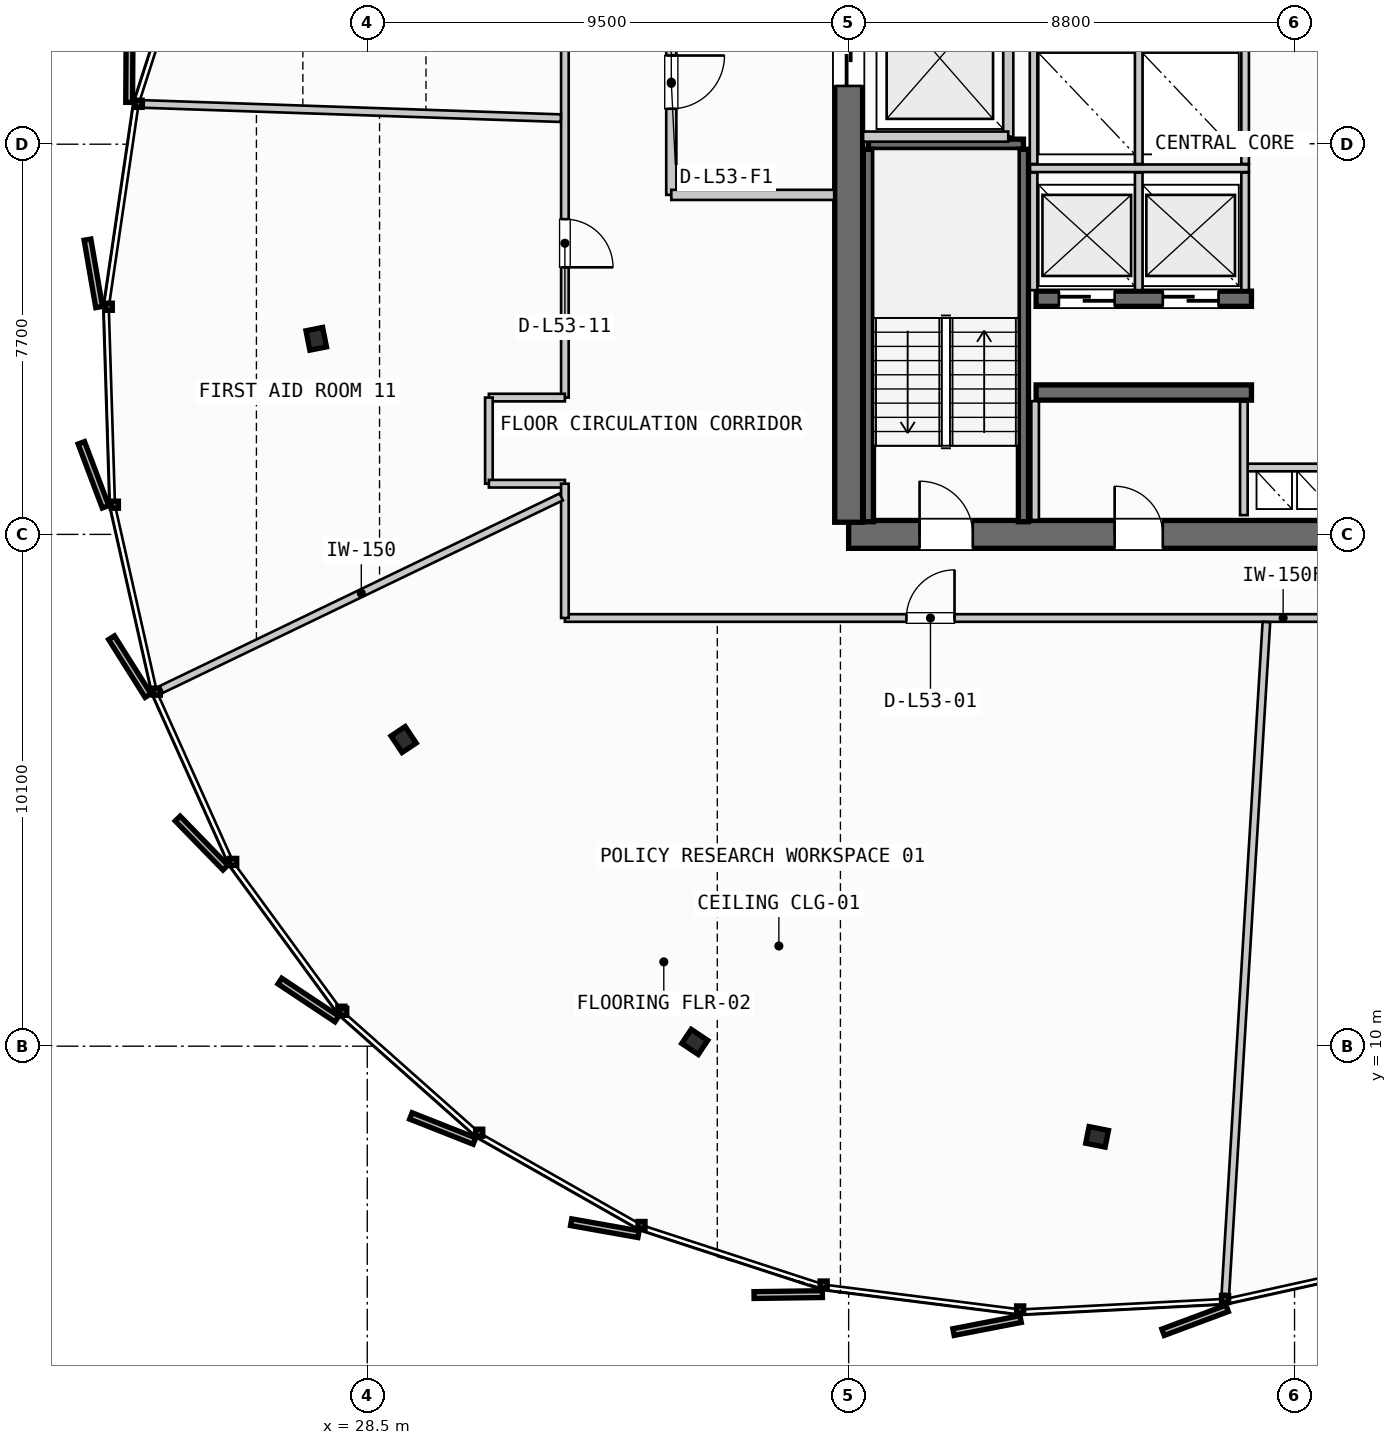
"""IFC4 building model, lengths in metres.
Left out: names, types, materials, properties, quantities, classifications, styles, units other than length and angle.
Written with IfcOpenShell. Run it as: python <this file> out.ifc"""

import sys

from ifc_helpers import new_model, si_unit, direction, frame, frame_2d, origin, origin_2d, place, context, subcontext, project, spatial, rectangle, i_section, extrude, source, transform, mapped, element, fill, save


model = new_model("IFC4")
c1 = context("Model", 3, precision=1e-05, world=origin(), true_north=direction((0.0, 1.0)))
c2 = subcontext(c1, "Body", "Model", "MODEL_VIEW")
j1 = project(units=[si_unit("LENGTHUNIT", "METRE"), si_unit("PLANEANGLEUNIT", "RADIAN")], contexts=[c1])
p1 = place(None, origin())
s1 = spatial("IfcSite", under=j1, at=p1, CompositionType="ELEMENT")
p2 = place(p1, origin())
s2 = spatial("IfcBuilding", under=s1, at=p2, CompositionType="ELEMENT")
p3 = place(p2, frame((0.0, 0.0, 204.4)))
s3 = spatial("IfcBuildingStorey", under=s2, at=p3, CompositionType="ELEMENT", Elevation=204.4)
p4 = place(p3, frame((38.0, 20.1, 0.0), z_axis=(0.0, 0.0, 1.0), x_axis=(1.0, 0.0, 0.0)))
e1 = element("IfcWall", 1, at=p4, inside=s3, PredefinedType="SHEAR", context=c2, shape_type="SweptSolid", body=[
    extrude(rectangle(XDim=17.6, YDim=0.55, at=frame_2d((8.8, 0.0))), origin(), (0.0, 0.0, 1.0), 3.26),
])
p5 = place(p4, frame((1.4, 0.0, 0.0)))
e2 = element("IfcOpeningElement", 2, at=p5, cuts=e1, PredefinedType="OPENING", context=c2, shape_type="SweptSolid", body=[
    extrude(rectangle(XDim=1.05, YDim=2.15, at=frame_2d((0.525, 1.075))), frame((0.0, 0.285, 0.0), z_axis=(0.0, -1.0, 0.0), x_axis=(1.0, 0.0, 0.0)), (0.0, 0.0, 1.0), 0.57),
])
p6 = place(p4, frame((15.15, 0.0, 0.0)))
e3 = element("IfcOpeningElement", 3, at=p6, cuts=e1, PredefinedType="OPENING", context=c2, shape_type="SweptSolid", body=[
    extrude(rectangle(XDim=1.05, YDim=2.15, at=frame_2d((0.525, 1.075))), frame((0.0, 0.285, 0.0), z_axis=(0.0, -1.0, 0.0), x_axis=(1.0, 0.0, 0.0)), (0.0, 0.0, 1.0), 0.57),
])
p7 = place(p4, frame((5.25, 0.0, 0.0)))
e4 = element("IfcOpeningElement", 4, at=p7, cuts=e1, PredefinedType="OPENING", context=c2, shape_type="SweptSolid", body=[
    extrude(rectangle(XDim=0.95, YDim=2.15, at=frame_2d((0.475, 1.075))), frame((0.0, 0.285, 0.0), z_axis=(0.0, -1.0, 0.0), x_axis=(1.0, 0.0, 0.0)), (0.0, 0.0, 1.0), 0.57),
])
p8 = place(p4, frame((11.4, 0.0, 0.0)))
e5 = element("IfcOpeningElement", 5, at=p8, cuts=e1, PredefinedType="OPENING", context=c2, shape_type="SweptSolid", body=[
    extrude(rectangle(XDim=0.95, YDim=2.15, at=frame_2d((0.475, 1.075))), frame((0.0, 0.285, 0.0), z_axis=(0.0, -1.0, 0.0), x_axis=(1.0, 0.0, 0.0)), (0.0, 0.0, 1.0), 0.57),
])
p9 = place(p3, frame((38.0, 35.26, 0.0), z_axis=(0.0, 0.0, 1.0), x_axis=(0.0, -1.0, 0.0)))
e6 = element("IfcWall", 6, at=p9, inside=s3, PredefinedType="SHEAR", context=c2, shape_type="SweptSolid", body=[
    extrude(rectangle(XDim=14.92, YDim=0.55, at=frame_2d((7.46, 0.0))), origin(), (0.0, 0.0, 1.0), 3.26),
])
p10 = place(p9, frame((5.21, 0.0, 0.0)))
e7 = element("IfcOpeningElement", 7, at=p10, cuts=e6, PredefinedType="OPENING", context=c2, shape_type="SweptSolid", body=[
    extrude(rectangle(XDim=1.1, YDim=2.2, at=frame_2d((0.55, 1.1))), frame((0.0, 0.285, 0.0), z_axis=(0.0, -1.0, 0.0), x_axis=(1.0, 0.0, 0.0)), (0.0, 0.0, 1.0), 0.57),
])
p11 = place(p3, frame((41.7, 22.9, 0.0), z_axis=(0.0, 0.0, 1.0), x_axis=(1.0, 0.0, 0.0)))
e8 = element("IfcWall", 8, at=p11, inside=s3, PredefinedType="SHEAR", context=c2, shape_type="SweptSolid", body=[
    extrude(rectangle(XDim=4.25, YDim=0.3, at=frame_2d((2.125, 0.0))), origin(), (0.0, 0.0, 1.0), 3.26),
])
p12 = place(p3, frame((41.7, 24.75, 0.0), z_axis=(0.0, 0.0, 1.0), x_axis=(1.0, 0.0, 0.0)))
e9 = element("IfcWall", 9, at=p12, inside=s3, PredefinedType="SHEAR", context=c2, shape_type="SweptSolid", body=[
    extrude(rectangle(XDim=4.25, YDim=0.3, at=frame_2d((2.125, 0.0))), origin(), (0.0, 0.0, 1.0), 3.26),
])
p13 = place(p12, frame((0.45, 0.0, 0.0)))
e10 = element("IfcOpeningElement", 10, at=p13, cuts=e9, PredefinedType="OPENING", context=c2, shape_type="SweptSolid", body=[
    extrude(rectangle(XDim=1.1, YDim=2.2, at=frame_2d((0.55, 1.1))), frame((0.0, 0.16, 0.0), z_axis=(0.0, -1.0, 0.0), x_axis=(1.0, 0.0, 0.0)), (0.0, 0.0, 1.0), 0.32),
])
p14 = place(p12, frame((2.5, 0.0, 0.0)))
e11 = element("IfcOpeningElement", 11, at=p14, cuts=e9, PredefinedType="OPENING", context=c2, shape_type="SweptSolid", body=[
    extrude(rectangle(XDim=1.1, YDim=2.2, at=frame_2d((0.55, 1.1))), frame((0.0, 0.16, 0.0), z_axis=(0.0, -1.0, 0.0), x_axis=(1.0, 0.0, 0.0)), (0.0, 0.0, 1.0), 0.32),
])
m1 = source(origin(), c2, "Body", "SweptSolid", [
    extrude(i_section(OverallWidth=0.391, OverallDepth=0.335, WebThickness=0.023, FlangeThickness=0.034, FilletRadius=0.015, at=origin_2d()), origin(), (0.0, 0.0, 1.0), 3.26),
])
for number, where, z_axis, x_axis in (
    (12, (27.493, 23.96, 0.0), (0.0, 0.0, 1.0), (-0.981, -0.195, 0.0)),
    (13, (29.218, 16.052, 0.0), (0.0, 0.0, 1.0), (-0.831, -0.556, 0.0)),
    (14, (34.963, 10.084, 0.0), (0.0, 0.0, 1.0), (-0.556, -0.831, 0.0)),
    (15, (42.904, 8.211, 0.0), (0.0, 0.0, 1.0), (-0.195, -0.981, 0.0)),
):
    element("IfcColumn", number, at=place(p3, frame(where, z_axis=z_axis, x_axis=x_axis)), inside=s3, PredefinedType="COLUMN", context=c2, shape_type="MappedRepresentation", body=[
        mapped(m1, transform((0.0, 0.0, 0.0), scale=1.0)),
    ])
p15 = place(p3, frame((38.39, 27.8, 0.0), z_axis=(0.0, 0.0, 1.0), x_axis=(1.0, 0.0, 0.0)))
e16 = element("IfcWall", 16, at=p15, inside=s3, PredefinedType="SHEAR", context=c2, shape_type="SweptSolid", body=[
    extrude(rectangle(XDim=3.06, YDim=0.2, at=frame_2d((1.53, 0.0))), origin(), (0.0, 0.0, 1.0), 3.26),
])
for number, where, z_axis, x_axis in (
    (17, (41.45, 27.7, 0.0), (0.0, 0.0, 1.0), (0.0, -1.0, 0.0)),
    (18, (38.39, 20.35, 0.0), (0.0, 0.0, 1.0), (0.0, 1.0, 0.0)),
):
    element("IfcWall", number, at=place(p3, frame(where, z_axis=z_axis, x_axis=x_axis)), inside=s3, PredefinedType="SHEAR", context=c2, shape_type="SweptSolid", body=[
        extrude(rectangle(XDim=7.35, YDim=0.2, at=frame_2d((3.675, 0.0))), origin(), (0.0, 0.0, 1.0), 3.26),
    ])
p16 = place(p3, frame((45.8, 21.42, 0.0), z_axis=(0.0, 0.0, 1.0), x_axis=(1.0, 0.0, 0.0)))
e19 = element("IfcWall", 19, at=p16, inside=s3, PredefinedType="PARTITIONING", context=c2, shape_type="SweptSolid", body=[
    extrude(rectangle(XDim=2.0, YDim=0.15, at=frame_2d((1.0, 0.0))), origin(), (0.0, 0.0, 1.0), 2.595),
])
p17 = place(p3, frame((45.8, 20.48, 0.0), z_axis=(0.0, 0.0, 1.0), x_axis=(0.0, 1.0, 0.0)))
e20 = element("IfcWall", 20, at=p17, inside=s3, PredefinedType="PARTITIONING", context=c2, shape_type="SweptSolid", body=[
    extrude(rectangle(XDim=2.24, YDim=0.15, at=frame_2d((1.12, 0.0))), origin(), (0.0, 0.0, 1.0), 2.595),
])
p18 = place(p3, frame((41.15, 27.95, 0.0), z_axis=(0.0, 0.0, 1.0), x_axis=(0.0, 1.0, 0.0)))
e21 = element("IfcWall", 21, at=p18, inside=s3, PredefinedType="PARTITIONING", context=c2, shape_type="SweptSolid", body=[
    extrude(rectangle(XDim=3.1, YDim=0.2, at=frame_2d((1.55, 0.0))), origin(), (0.0, 0.0, 1.0), 2.595),
])
p19 = place(p3, frame((38.285, 27.95, 0.0), z_axis=(0.0, 0.0, 1.0), x_axis=(1.0, 0.0, 0.0)))
e22 = element("IfcWall", 22, at=p19, inside=s3, PredefinedType="PARTITIONING", context=c2, shape_type="SweptSolid", body=[
    extrude(rectangle(XDim=2.865, YDim=0.2, at=frame_2d((1.433, 0.0))), origin(), (0.0, 0.0, 1.0), 2.595),
])
p20 = place(p3, frame((34.5, 31.2, 0.0), z_axis=(0.0, 0.0, 1.0), x_axis=(0.0, -1.0, 0.0)))
e23 = element("IfcWall", 23, at=p20, inside=s3, PredefinedType="PARTITIONING", context=c2, shape_type="SweptSolid", body=[
    extrude(rectangle(XDim=4.4, YDim=0.2, at=frame_2d((2.2, 0.0))), origin(), (0.0, 0.0, 1.0), 2.595),
])
p21 = place(p20, frame((1.65, 0.0, 0.0)))
e24 = element("IfcOpeningElement", 24, at=p21, cuts=e23, PredefinedType="OPENING", context=c2, shape_type="SweptSolid", body=[
    extrude(rectangle(XDim=1.05, YDim=2.15, at=frame_2d((0.525, 1.075))), frame((0.0, 0.11, 0.0), z_axis=(0.0, -1.0, 0.0), x_axis=(1.0, 0.0, 0.0)), (0.0, 0.0, 1.0), 0.22),
])
p22 = place(p3, frame((34.5, 26.8, 0.0), z_axis=(0.0, 0.0, 1.0), x_axis=(1.0, 0.0, 0.0)))
e25 = element("IfcWall", 25, at=p22, inside=s3, PredefinedType="PARTITIONING", context=c2, shape_type="SweptSolid", body=[
    extrude(rectangle(XDim=3.215, YDim=0.2, at=frame_2d((1.607, 0.0))), origin(), (0.0, 0.0, 1.0), 2.595),
])
p23 = place(p3, frame((41.68, 20.385, 0.0), z_axis=(0.0, 0.0, 1.0), x_axis=(0.0, 1.0, 0.0)))
e26 = element("IfcWall", 26, at=p23, inside=s3, PredefinedType="PARTITIONING", context=c2, shape_type="SweptSolid", body=[
    extrude(rectangle(XDim=2.345, YDim=0.15, at=frame_2d((1.172, 0.0))), origin(), (0.0, 0.0, 1.0), 2.595),
])
p24 = place(p3, frame((41.58, 27.325, 0.0), z_axis=(0.0, 0.0, 1.0), x_axis=(1.0, 0.0, 0.0)))
e27 = element("IfcWall", 27, at=p24, inside=s3, PredefinedType="PARTITIONING", context=c2, shape_type="SweptSolid", body=[
    extrude(rectangle(XDim=4.32, YDim=0.15, at=frame_2d((2.16, 0.0))), origin(), (0.0, 0.0, 1.0), 2.595),
])
for number, where, z_axis, x_axis in (
    (28, (41.65, 24.92, 0.0), (0.0, 0.0, 1.0), (0.0, 1.0, 0.0)),
    (29, (43.725, 24.92, 0.0), (0.0, 0.0, 1.0), (0.0, 1.0, 0.0)),
    (30, (45.825, 24.92, 0.0), (0.0, 0.0, 1.0), (0.0, 1.0, 0.0)),
):
    element("IfcWall", number, at=place(p3, frame(where, z_axis=z_axis, x_axis=x_axis)), inside=s3, PredefinedType="PARTITIONING", context=c2, shape_type="SweptSolid", body=[
        extrude(rectangle(XDim=2.32, YDim=0.15, at=frame_2d((1.16, 0.0))), origin(), (0.0, 0.0, 1.0), 2.595),
    ])
for number, where, z_axis, x_axis in (
    (31, (41.65, 27.41, 0.0), (0.0, 0.0, 1.0), (0.0, 1.0, 0.0)),
    (32, (43.725, 27.41, 0.0), (0.0, 0.0, 1.0), (0.0, 1.0, 0.0)),
    (33, (45.825, 27.41, 0.0), (0.0, 0.0, 1.0), (0.0, 1.0, 0.0)),
):
    element("IfcWall", number, at=place(p3, frame(where, z_axis=z_axis, x_axis=x_axis)), inside=s3, PredefinedType="PARTITIONING", context=c2, shape_type="SweptSolid", body=[
        extrude(rectangle(XDim=2.27, YDim=0.15, at=frame_2d((1.135, 0.0))), origin(), (0.0, 0.0, 1.0), 2.595),
    ])
p25 = place(p3, frame((32.4, 18.45, 0.0), z_axis=(0.0, 0.0, 1.0), x_axis=(1.0, 0.0, 0.0)))
e34 = element("IfcWall", 34, at=p25, inside=s3, PredefinedType="PARTITIONING", context=c2, shape_type="SweptSolid", body=[
    extrude(rectangle(XDim=28.35, YDim=0.15, at=frame_2d((14.175, 0.0))), origin(), (0.0, 0.0, 1.0), 2.595),
])
p26 = place(p25, frame((6.74, 0.0, 0.0)))
e35 = element("IfcOpeningElement", 35, at=p26, cuts=e34, PredefinedType="OPENING", context=c2, shape_type="SweptSolid", body=[
    extrude(rectangle(XDim=0.95, YDim=2.15, at=frame_2d((0.475, 1.075))), frame((0.0, 0.085, 0.0), z_axis=(0.0, -1.0, 0.0), x_axis=(1.0, 0.0, 0.0)), (0.0, 0.0, 1.0), 0.17),
])
p27 = place(p25, frame((20.335, 0.0, 0.0)))
e36 = element("IfcOpeningElement", 36, at=p27, cuts=e34, PredefinedType="OPENING", context=c2, shape_type="SweptSolid", body=[
    extrude(rectangle(XDim=0.95, YDim=2.15, at=frame_2d((0.475, 1.075))), frame((0.0, 0.085, 0.0), z_axis=(0.0, -1.0, 0.0), x_axis=(1.0, 0.0, 0.0)), (0.0, 0.0, 1.0), 0.17),
])
p28 = place(p3, frame((32.4, 32.8, 0.0), z_axis=(0.0, 0.0, 1.0), x_axis=(0.0, -1.0, 0.0)))
e37 = element("IfcWall", 37, at=p28, inside=s3, PredefinedType="PARTITIONING", context=c2, shape_type="SweptSolid", body=[
    extrude(rectangle(XDim=10.0, YDim=0.15, at=frame_2d((5.0, 0.0))), origin(), (0.0, 0.0, 1.0), 2.595),
])
p29 = place(p28, frame((2.059, 0.0, 0.0)))
e38 = element("IfcOpeningElement", 38, at=p29, cuts=e37, PredefinedType="OPENING", context=c2, shape_type="SweptSolid", body=[
    extrude(rectangle(XDim=0.95, YDim=2.15, at=frame_2d((0.475, 1.075))), frame((0.0, 0.085, 0.0), z_axis=(0.0, -1.0, 0.0), x_axis=(1.0, 0.0, 0.0)), (0.0, 0.0, 1.0), 0.17),
])
p30 = place(p28, frame((6.479, 0.0, 0.0)))
e39 = element("IfcOpeningElement", 39, at=p30, cuts=e37, PredefinedType="OPENING", context=c2, shape_type="SweptSolid", body=[
    extrude(rectangle(XDim=0.95, YDim=2.15, at=frame_2d((0.475, 1.075))), frame((0.0, 0.085, 0.0), z_axis=(0.0, -1.0, 0.0), x_axis=(1.0, 0.0, 0.0)), (0.0, 0.0, 1.0), 0.17),
])
p31 = place(p3, frame((32.4, 22.8, 0.0), z_axis=(0.0, 0.0, 1.0), x_axis=(-1.0, 0.0, 0.0)))
e40 = element("IfcWall", 40, at=p31, inside=s3, PredefinedType="PARTITIONING", context=c2, shape_type="SweptSolid", body=[
    extrude(rectangle(XDim=1.5, YDim=0.15, at=frame_2d((0.75, 0.0))), origin(), (0.0, 0.0, 1.0), 2.595),
])
p32 = place(p3, frame((30.9, 22.8, 0.0), z_axis=(0.0, 0.0, 1.0), x_axis=(0.0, -1.0, 0.0)))
e41 = element("IfcWall", 41, at=p32, inside=s3, PredefinedType="PARTITIONING", context=c2, shape_type="SweptSolid", body=[
    extrude(rectangle(XDim=1.7, YDim=0.15, at=frame_2d((0.85, 0.0))), origin(), (0.0, 0.0, 1.0), 2.595),
])
p33 = place(p3, frame((30.9, 21.1, 0.0), z_axis=(0.0, 0.0, 1.0), x_axis=(1.0, 0.0, 0.0)))
e42 = element("IfcWall", 42, at=p33, inside=s3, PredefinedType="PARTITIONING", context=c2, shape_type="SweptSolid", body=[
    extrude(rectangle(XDim=1.5, YDim=0.15, at=frame_2d((0.75, 0.0))), origin(), (0.0, 0.0, 1.0), 2.595),
])
p34 = place(p3, frame((32.4, 21.1, 0.0), z_axis=(0.0, 0.0, 1.0), x_axis=(0.0, -1.0, 0.0)))
e43 = element("IfcWall", 43, at=p34, inside=s3, PredefinedType="PARTITIONING", context=c2, shape_type="SweptSolid", body=[
    extrude(rectangle(XDim=2.65, YDim=0.15, at=frame_2d((1.325, 0.0))), origin(), (0.0, 0.0, 1.0), 2.595),
])
p35 = place(p3, frame((32.328, 20.839, 0.0), z_axis=(0.0, 0.0, 1.0), x_axis=(-0.901038386283, -0.43373935312, 0.0)))
e44 = element("IfcWall", 44, at=p35, inside=s3, PredefinedType="PARTITIONING", context=c2, shape_type="SweptSolid", body=[
    extrude(rectangle(XDim=8.759, YDim=0.15, at=frame_2d((4.379, 0.0))), origin(), (0.0, 0.0, 1.0), 2.595),
])
p36 = place(p3, frame((46.245, 18.37, 0.0), z_axis=(0.0, 0.0, 1.0), x_axis=(-0.060966188307, -0.998139831829, 0.0)))
e45 = element("IfcWall", 45, at=p36, inside=s3, PredefinedType="PARTITIONING", context=c2, shape_type="SweptSolid", body=[
    extrude(rectangle(XDim=13.283, YDim=0.15, at=frame_2d((6.642, 0.0))), origin(), (0.0, 0.0, 1.0), 2.595),
])
p37 = place(p3, frame((32.32, 28.314, 0.0), z_axis=(0.0, 0.0, 1.0), x_axis=(-0.999420901032, 0.034027379868, 0.0)))
e46 = element("IfcWall", 46, at=p37, inside=s3, PredefinedType="PARTITIONING", context=c2, shape_type="SweptSolid", body=[
    extrude(rectangle(XDim=8.237, YDim=0.15, at=frame_2d((4.118, 0.0))), origin(), (0.0, 0.0, 1.0), 2.595),
])
m2 = source(origin(), c2, "Body", "SweptSolid", [
    extrude(rectangle(XDim=1.05, YDim=2.15, at=frame_2d((0.525, 1.075))), frame((0.0, 0.025, 0.0), z_axis=(0.0, -1.0, 0.0), x_axis=(1.0, 0.0, 0.0)), (0.0, 0.0, 1.0), 0.05),
])
p38 = place(p5, origin())
e47 = element("IfcDoor", 47, at=p38, inside=s3, OperationType="SINGLE_SWING_LEFT", PredefinedType="DOOR", context=c2, shape_type="MappedRepresentation", body=[
    mapped(m2, transform((0.0, 0.0, 0.0), scale=1.0)),
])
fill(e2, e47)
m3 = source(origin(), c2, "Body", "SweptSolid", [
    extrude(rectangle(XDim=1.1, YDim=2.2, at=frame_2d((0.55, 1.1))), frame((0.0, 0.025, 0.0), z_axis=(0.0, -1.0, 0.0), x_axis=(1.0, 0.0, 0.0)), (0.0, 0.0, 1.0), 0.05),
])
p39 = place(p10, origin())
e48 = element("IfcDoor", 48, at=p39, inside=s3, OperationType="SLIDING_TO_LEFT", PredefinedType="DOOR", context=c2, shape_type="MappedRepresentation", body=[
    mapped(m3, transform((0.0, 0.0, 0.0), scale=1.0)),
])
fill(e7, e48)
m4 = source(origin(), c2, "Body", "SweptSolid", [
    extrude(rectangle(XDim=0.95, YDim=2.15, at=frame_2d((0.475, 1.075))), frame((0.0, 0.025, 0.0), z_axis=(0.0, -1.0, 0.0), x_axis=(1.0, 0.0, 0.0)), (0.0, 0.0, 1.0), 0.05),
])
p40 = place(p7, origin())
e49 = element("IfcDoor", 49, at=p40, inside=s3, OperationType="SINGLE_SWING_LEFT", PredefinedType="DOOR", context=c2, shape_type="MappedRepresentation", body=[
    mapped(m4, transform((0.0, 0.0, 0.0), scale=1.0)),
])
fill(e4, e49)
p41 = place(p13, origin())
e50 = element("IfcDoor", 50, at=p41, inside=s3, OperationType="SLIDING_TO_RIGHT", PredefinedType="DOOR", context=c2, shape_type="MappedRepresentation", body=[
    mapped(m3, transform((0.0, 0.0, 0.0), scale=1.0)),
])
fill(e10, e50)
p42 = place(p14, origin())
e51 = element("IfcDoor", 51, at=p42, inside=s3, OperationType="SLIDING_TO_RIGHT", PredefinedType="DOOR", context=c2, shape_type="MappedRepresentation", body=[
    mapped(m3, transform((0.0, 0.0, 0.0), scale=1.0)),
])
fill(e11, e51)
p43 = place(p21, origin())
e52 = element("IfcDoor", 52, at=p43, inside=s3, OperationType="SINGLE_SWING_LEFT", PredefinedType="DOOR", context=c2, shape_type="MappedRepresentation", body=[
    mapped(m2, transform((0.0, 0.0, 0.0), scale=1.0)),
])
fill(e24, e52)
p44 = place(p26, origin())
e53 = element("IfcDoor", 53, at=p44, inside=s3, OperationType="SINGLE_SWING_RIGHT", PredefinedType="DOOR", context=c2, shape_type="MappedRepresentation", body=[
    mapped(m4, transform((0.0, 0.0, 0.0), scale=1.0)),
])
fill(e35, e53)
p45 = place(p30, origin())
e54 = element("IfcDoor", 54, at=p45, inside=s3, OperationType="SINGLE_SWING_RIGHT", PredefinedType="DOOR", context=c2, shape_type="MappedRepresentation", body=[
    mapped(m4, transform((0.0, 0.0, 0.0), scale=1.0)),
])
fill(e39, e54)
save(model, sys.argv[1])
